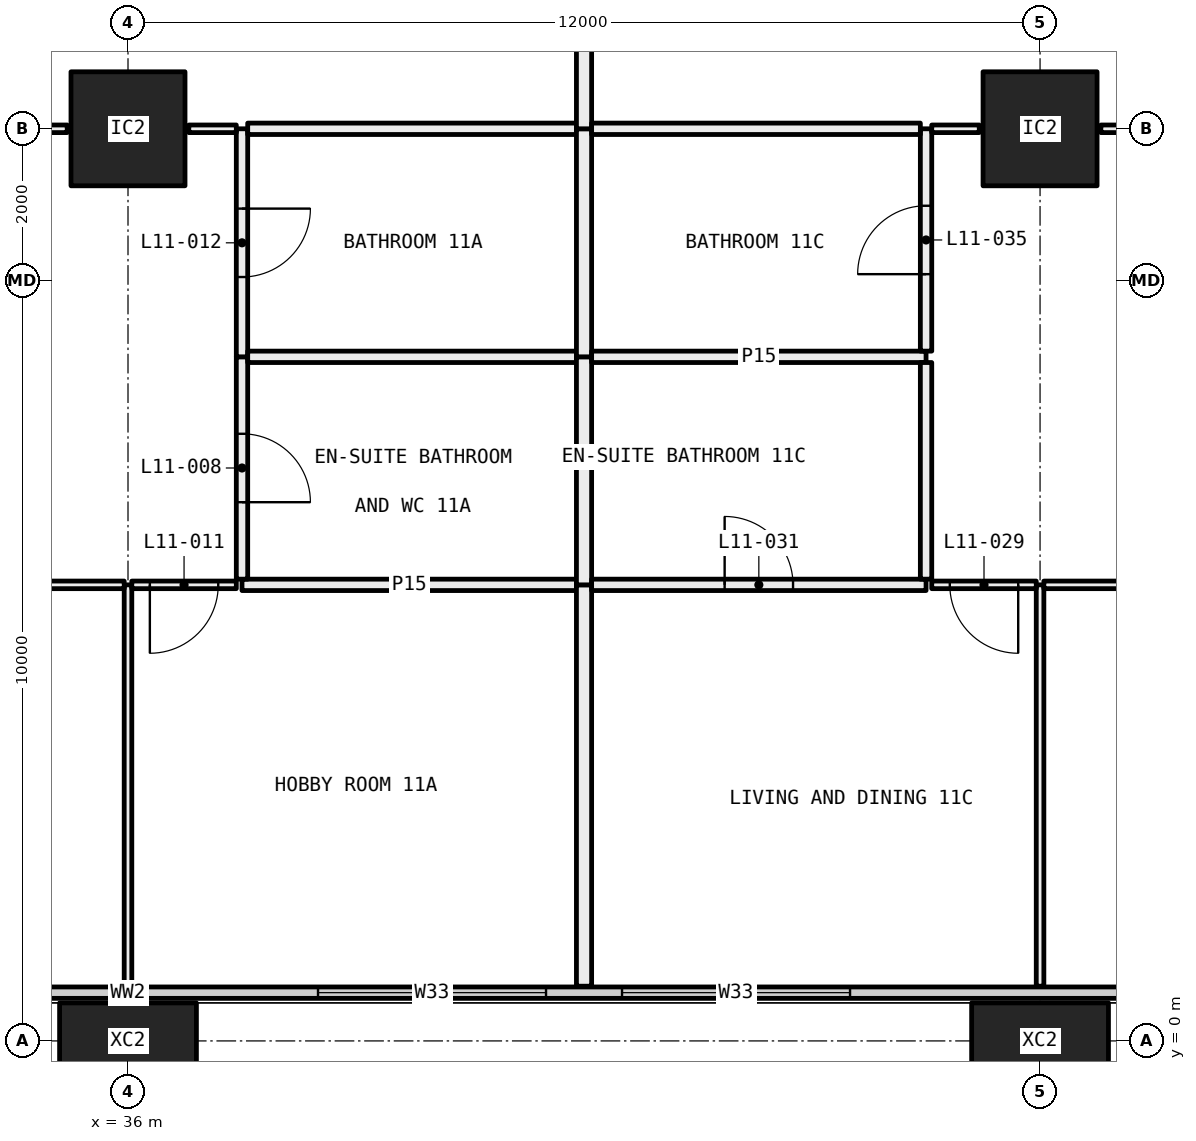
"""IFC4 building model, lengths in metres.
Left out: names, types, materials, properties, quantities, classifications, styles, units other than length and angle.
Written with IfcOpenShell. Run it as: python <this file> out.ifc"""

import sys

from ifc_helpers import new_model, si_unit, direction, frame, frame_2d, origin, origin_2d, place, context, subcontext, project, spatial, rectangle, hollow_rectangle, extrude, element, fill, save


model = new_model("IFC4")
c1 = context("Model", 3, precision=1e-05, world=origin(), true_north=direction((0.0, 1.0)))
c2 = subcontext(c1, "Body", "Model", "MODEL_VIEW")
j1 = project(units=[si_unit("LENGTHUNIT", "METRE"), si_unit("PLANEANGLEUNIT", "RADIAN")], contexts=[c1])
p1 = place(None, origin())
s1 = spatial("IfcSite", under=j1, at=p1, CompositionType="ELEMENT")
p2 = place(p1, origin())
s2 = spatial("IfcBuilding", under=s1, at=p2, CompositionType="ELEMENT")
p3 = place(p2, frame((0.0, 0.0, 50.7)))
s3 = spatial("IfcBuildingStorey", under=s2, at=p3, CompositionType="ELEMENT", Elevation=50.7)
p4 = place(p3, frame((36.0, 0.0, -0.4), z_axis=(0.0, 0.0, 1.0), x_axis=(1.0, 0.0, 0.0)))
e1 = element("IfcColumn", 1, at=p4, inside=s3, PredefinedType="COLUMN", context=c2, shape_type="SweptSolid", body=[
    extrude(hollow_rectangle(XDim=1.8, YDim=1.0, WallThickness=0.07, at=origin_2d()), origin(), (0.0, 0.0, 1.0), 3.45),
])
p5 = place(p3, frame((36.0, 12.0, 0.0), z_axis=(0.0, 0.0, 1.0), x_axis=(1.0, 0.0, 0.0)))
e2 = element("IfcColumn", 2, at=p5, inside=s3, PredefinedType="COLUMN", context=c2, shape_type="SweptSolid", body=[
    extrude(hollow_rectangle(XDim=1.5, YDim=1.5, WallThickness=0.065, at=origin_2d()), origin(), (0.0, 0.0, 1.0), 3.05),
])
p6 = place(p3, frame((48.0, 0.0, -0.4), z_axis=(0.0, 0.0, 1.0), x_axis=(1.0, 0.0, 0.0)))
e3 = element("IfcColumn", 3, at=p6, inside=s3, PredefinedType="COLUMN", context=c2, shape_type="SweptSolid", body=[
    extrude(hollow_rectangle(XDim=1.8, YDim=1.0, WallThickness=0.07, at=origin_2d()), origin(), (0.0, 0.0, 1.0), 3.45),
])
p7 = place(p3, frame((48.0, 12.0, 0.0), z_axis=(0.0, 0.0, 1.0), x_axis=(1.0, 0.0, 0.0)))
e4 = element("IfcColumn", 4, at=p7, inside=s3, PredefinedType="COLUMN", context=c2, shape_type="SweptSolid", body=[
    extrude(hollow_rectangle(XDim=1.5, YDim=1.5, WallThickness=0.065, at=origin_2d()), origin(), (0.0, 0.0, 1.0), 3.05),
])
p8 = place(p3, frame((6.56, 0.635, 0.0), z_axis=(0.0, 0.0, 1.0), x_axis=(1.0, 0.0, 0.0)))
e5 = element("IfcWall", 5, at=p8, inside=s3, PredefinedType="ELEMENTEDWALL", context=c2, shape_type="SweptSolid", body=[
    extrude(rectangle(XDim=58.88, YDim=0.15, at=frame_2d((29.44, 0.0))), origin(), (0.0, 0.0, 1.0), 3.05),
])
p9 = place(p8, frame((0.44, 0.0, 0.45)))
e6 = element("IfcOpeningElement", 6, at=p9, cuts=e5, PredefinedType="OPENING", context=c2, shape_type="SweptSolid", body=[
    extrude(rectangle(XDim=4.5, YDim=2.55, at=frame_2d((2.25, 1.275))), frame((0.0, 0.085, 0.0), z_axis=(0.0, -1.0, 0.0), x_axis=(1.0, 0.0, 0.0)), (0.0, 0.0, 1.0), 0.17),
])
p10 = place(p8, frame((7.94, 0.0, 0.45)))
e7 = element("IfcOpeningElement", 7, at=p10, cuts=e5, PredefinedType="OPENING", context=c2, shape_type="SweptSolid", body=[
    extrude(rectangle(XDim=3.0, YDim=2.55, at=frame_2d((1.5, 1.275))), frame((0.0, 0.085, 0.0), z_axis=(0.0, -1.0, 0.0), x_axis=(1.0, 0.0, 0.0)), (0.0, 0.0, 1.0), 0.17),
])
p11 = place(p8, frame((11.94, 0.0, 0.45)))
e8 = element("IfcOpeningElement", 8, at=p11, cuts=e5, PredefinedType="OPENING", context=c2, shape_type="SweptSolid", body=[
    extrude(rectangle(XDim=3.0, YDim=2.55, at=frame_2d((1.5, 1.275))), frame((0.0, 0.085, 0.0), z_axis=(0.0, -1.0, 0.0), x_axis=(1.0, 0.0, 0.0)), (0.0, 0.0, 1.0), 0.17),
])
p12 = place(p8, frame((19.94, 0.0, 0.45)))
e9 = element("IfcOpeningElement", 9, at=p12, cuts=e5, PredefinedType="OPENING", context=c2, shape_type="SweptSolid", body=[
    extrude(rectangle(XDim=3.0, YDim=2.55, at=frame_2d((1.5, 1.275))), frame((0.0, 0.085, 0.0), z_axis=(0.0, -1.0, 0.0), x_axis=(1.0, 0.0, 0.0)), (0.0, 0.0, 1.0), 0.17),
])
p13 = place(p8, frame((23.94, 0.0, 0.45)))
e10 = element("IfcOpeningElement", 10, at=p13, cuts=e5, PredefinedType="OPENING", context=c2, shape_type="SweptSolid", body=[
    extrude(rectangle(XDim=2.0, YDim=2.55, at=frame_2d((1.0, 1.275))), frame((0.0, 0.085, 0.0), z_axis=(0.0, -1.0, 0.0), x_axis=(1.0, 0.0, 0.0)), (0.0, 0.0, 1.0), 0.17),
])
p14 = place(p8, frame((31.94, 0.0, 0.45)))
e11 = element("IfcOpeningElement", 11, at=p14, cuts=e5, PredefinedType="OPENING", context=c2, shape_type="SweptSolid", body=[
    extrude(rectangle(XDim=3.0, YDim=2.55, at=frame_2d((1.5, 1.275))), frame((0.0, 0.085, 0.0), z_axis=(0.0, -1.0, 0.0), x_axis=(1.0, 0.0, 0.0)), (0.0, 0.0, 1.0), 0.17),
])
p15 = place(p8, frame((35.94, 0.0, 0.45)))
e12 = element("IfcOpeningElement", 12, at=p15, cuts=e5, PredefinedType="OPENING", context=c2, shape_type="SweptSolid", body=[
    extrude(rectangle(XDim=3.0, YDim=2.55, at=frame_2d((1.5, 1.275))), frame((0.0, 0.085, 0.0), z_axis=(0.0, -1.0, 0.0), x_axis=(1.0, 0.0, 0.0)), (0.0, 0.0, 1.0), 0.17),
])
p16 = place(p8, frame((43.94, 0.0, 0.45)))
e13 = element("IfcOpeningElement", 13, at=p16, cuts=e5, PredefinedType="OPENING", context=c2, shape_type="SweptSolid", body=[
    extrude(rectangle(XDim=3.0, YDim=2.55, at=frame_2d((1.5, 1.275))), frame((0.0, 0.085, 0.0), z_axis=(0.0, -1.0, 0.0), x_axis=(1.0, 0.0, 0.0)), (0.0, 0.0, 1.0), 0.17),
])
p17 = place(p8, frame((47.94, 0.0, 0.45)))
e14 = element("IfcOpeningElement", 14, at=p17, cuts=e5, PredefinedType="OPENING", context=c2, shape_type="SweptSolid", body=[
    extrude(rectangle(XDim=2.0, YDim=2.55, at=frame_2d((1.0, 1.275))), frame((0.0, 0.085, 0.0), z_axis=(0.0, -1.0, 0.0), x_axis=(1.0, 0.0, 0.0)), (0.0, 0.0, 1.0), 0.17),
])
p18 = place(p8, frame((53.94, 0.0, 0.45)))
e15 = element("IfcOpeningElement", 15, at=p18, cuts=e5, PredefinedType="OPENING", context=c2, shape_type="SweptSolid", body=[
    extrude(rectangle(XDim=4.5, YDim=2.55, at=frame_2d((2.25, 1.275))), frame((0.0, 0.085, 0.0), z_axis=(0.0, -1.0, 0.0), x_axis=(1.0, 0.0, 0.0)), (0.0, 0.0, 1.0), 0.17),
])
p19 = place(p3, frame((36.0, 0.72, 0.0), z_axis=(0.0, 0.0, 1.0), x_axis=(0.0, 1.0, 0.0)))
e16 = element("IfcWall", 16, at=p19, inside=s3, PredefinedType="PARTITIONING", context=c2, shape_type="SweptSolid", body=[
    extrude(rectangle(XDim=5.28, YDim=0.1, at=frame_2d((2.64, 0.0))), origin(), (0.0, 0.0, 1.0), 2.45),
])
p20 = place(p3, frame((35.95, 6.0, 0.0), z_axis=(0.0, 0.0, 1.0), x_axis=(-1.0, 0.0, 0.0)))
e17 = element("IfcWall", 17, at=p20, inside=s3, PredefinedType="PARTITIONING", context=c2, shape_type="SweptSolid", body=[
    extrude(rectangle(XDim=5.9, YDim=0.1, at=frame_2d((2.95, 0.0))), origin(), (0.0, 0.0, 1.0), 2.45),
])
p21 = place(p20, frame((2.5, 0.0, 0.0)))
e18 = element("IfcOpeningElement", 18, at=p21, cuts=e17, PredefinedType="OPENING", context=c2, shape_type="SweptSolid", body=[
    extrude(rectangle(XDim=0.9, YDim=2.1, at=frame_2d((0.45, 1.05))), frame((0.0, 0.06, 0.0), z_axis=(0.0, -1.0, 0.0), x_axis=(1.0, 0.0, 0.0)), (0.0, 0.0, 1.0), 0.12),
])
p22 = place(p3, frame((37.425, 6.0, 0.0), z_axis=(0.0, 0.0, 1.0), x_axis=(-1.0, 0.0, 0.0)))
e19 = element("IfcWall", 19, at=p22, inside=s3, PredefinedType="PARTITIONING", context=c2, shape_type="SweptSolid", body=[
    extrude(rectangle(XDim=1.375, YDim=0.1, at=frame_2d((0.688, 0.0))), origin(), (0.0, 0.0, 1.0), 2.45),
])
p23 = place(p22, frame((0.238, 0.0, 0.0)))
e20 = element("IfcOpeningElement", 20, at=p23, cuts=e19, PredefinedType="OPENING", context=c2, shape_type="SweptSolid", body=[
    extrude(rectangle(XDim=0.9, YDim=2.1, at=frame_2d((0.45, 1.05))), frame((0.0, 0.06, 0.0), z_axis=(0.0, -1.0, 0.0), x_axis=(1.0, 0.0, 0.0)), (0.0, 0.0, 1.0), 0.12),
])
p24 = place(p3, frame((41.9, 6.0, 0.0), z_axis=(0.0, 0.0, 1.0), x_axis=(-1.0, 0.0, 0.0)))
e21 = element("IfcWall", 21, at=p24, inside=s3, PredefinedType="PARTITIONING", context=c2, shape_type="SweptSolid", body=[
    extrude(rectangle(XDim=4.4, YDim=0.15, at=frame_2d((2.2, 0.0))), origin(), (0.0, 0.0, 1.0), 3.05),
])
p25 = place(p3, frame((42.0, 0.72, 0.0), z_axis=(0.0, 0.0, 1.0), x_axis=(0.0, 1.0, 0.0)))
e22 = element("IfcWall", 22, at=p25, inside=s3, PredefinedType="PARTITIONING", context=c2, shape_type="SweptSolid", body=[
    extrude(rectangle(XDim=5.28, YDim=0.2, at=frame_2d((2.64, 0.0))), origin(), (0.0, 0.0, 1.0), 3.05),
])
p26 = place(p3, frame((37.5, 6.075, 0.0), z_axis=(0.0, 0.0, 1.0), x_axis=(0.0, 1.0, 0.0)))
e23 = element("IfcWall", 23, at=p26, inside=s3, PredefinedType="PARTITIONING", context=c2, shape_type="SweptSolid", body=[
    extrude(rectangle(XDim=2.925, YDim=0.15, at=frame_2d((1.462, 0.0))), origin(), (0.0, 0.0, 1.0), 3.05),
])
p27 = place(p26, frame((1.012, 0.0, 0.0)))
e24 = element("IfcOpeningElement", 24, at=p27, cuts=e23, PredefinedType="OPENING", context=c2, shape_type="SweptSolid", body=[
    extrude(rectangle(XDim=0.9, YDim=2.1, at=frame_2d((0.45, 1.05))), frame((0.0, 0.085, 0.0), z_axis=(0.0, -1.0, 0.0), x_axis=(1.0, 0.0, 0.0)), (0.0, 0.0, 1.0), 0.17),
])
p28 = place(p3, frame((37.5, 9.0, 0.0), z_axis=(0.0, 0.0, 1.0), x_axis=(0.0, 1.0, 0.0)))
e25 = element("IfcWall", 25, at=p28, inside=s3, PredefinedType="PARTITIONING", context=c2, shape_type="SweptSolid", body=[
    extrude(rectangle(XDim=3.0, YDim=0.15, at=frame_2d((1.5, 0.0))), origin(), (0.0, 0.0, 1.0), 2.45),
])
p29 = place(p28, frame((1.05, 0.0, 0.0)))
e26 = element("IfcOpeningElement", 26, at=p29, cuts=e25, PredefinedType="OPENING", context=c2, shape_type="SweptSolid", body=[
    extrude(rectangle(XDim=0.9, YDim=2.1, at=frame_2d((0.45, 1.05))), frame((0.0, 0.085, 0.0), z_axis=(0.0, -1.0, 0.0), x_axis=(1.0, 0.0, 0.0)), (0.0, 0.0, 1.0), 0.17),
])
p30 = place(p3, frame((35.2, 12.0, 0.0), z_axis=(0.0, 0.0, 1.0), x_axis=(-1.0, 0.0, 0.0)))
e27 = element("IfcWall", 27, at=p30, inside=s3, PredefinedType="PARTITIONING", context=c2, shape_type="SweptSolid", body=[
    extrude(rectangle(XDim=2.2, YDim=0.1, at=frame_2d((1.1, 0.0))), origin(), (0.0, 0.0, 1.0), 2.45),
])
p31 = place(p30, frame((0.65, 0.0, 0.0)))
e28 = element("IfcOpeningElement", 28, at=p31, cuts=e27, PredefinedType="OPENING", context=c2, shape_type="SweptSolid", body=[
    extrude(rectangle(XDim=0.9, YDim=2.1, at=frame_2d((0.45, 1.05))), frame((0.0, 0.06, 0.0), z_axis=(0.0, -1.0, 0.0), x_axis=(1.0, 0.0, 0.0)), (0.0, 0.0, 1.0), 0.12),
])
p32 = place(p3, frame((37.425, 12.0, 0.0), z_axis=(0.0, 0.0, 1.0), x_axis=(-1.0, 0.0, 0.0)))
e29 = element("IfcWall", 29, at=p32, inside=s3, PredefinedType="PARTITIONING", context=c2, shape_type="SweptSolid", body=[
    extrude(rectangle(XDim=0.625, YDim=0.1, at=frame_2d((0.312, 0.0))), origin(), (0.0, 0.0, 1.0), 2.45),
])
p33 = place(p3, frame((41.9, 9.0, 0.0), z_axis=(0.0, 0.0, 1.0), x_axis=(-1.0, 0.0, 0.0)))
e30 = element("IfcWall", 30, at=p33, inside=s3, PredefinedType="PARTITIONING", context=c2, shape_type="SweptSolid", body=[
    extrude(rectangle(XDim=4.325, YDim=0.15, at=frame_2d((2.163, 0.0))), origin(), (0.0, 0.0, 1.0), 3.05),
])
p34 = place(p3, frame((42.0, 6.0, 0.0), z_axis=(0.0, 0.0, 1.0), x_axis=(0.0, 1.0, 0.0)))
e31 = element("IfcWall", 31, at=p34, inside=s3, PredefinedType="PARTITIONING", context=c2, shape_type="SweptSolid", body=[
    extrude(rectangle(XDim=3.0, YDim=0.2, at=frame_2d((1.5, 0.0))), origin(), (0.0, 0.0, 1.0), 3.05),
])
p35 = place(p3, frame((41.9, 12.0, 0.0), z_axis=(0.0, 0.0, 1.0), x_axis=(-1.0, 0.0, 0.0)))
e32 = element("IfcWall", 32, at=p35, inside=s3, PredefinedType="PARTITIONING", context=c2, shape_type="SweptSolid", body=[
    extrude(rectangle(XDim=4.325, YDim=0.15, at=frame_2d((2.163, 0.0))), origin(), (0.0, 0.0, 1.0), 2.45),
])
p36 = place(p3, frame((42.0, 9.0, 0.0), z_axis=(0.0, 0.0, 1.0), x_axis=(0.0, 1.0, 0.0)))
e33 = element("IfcWall", 33, at=p36, inside=s3, PredefinedType="PARTITIONING", context=c2, shape_type="SweptSolid", body=[
    extrude(rectangle(XDim=3.0, YDim=0.2, at=frame_2d((1.5, 0.0))), origin(), (0.0, 0.0, 1.0), 2.45),
])
p37 = place(p3, frame((42.0, 12.0, 0.0), z_axis=(0.0, 0.0, 1.0), x_axis=(0.0, 1.0, 0.0)))
e34 = element("IfcWall", 34, at=p37, inside=s3, PredefinedType="PARTITIONING", context=c2, shape_type="SweptSolid", body=[
    extrude(rectangle(XDim=5.9, YDim=0.2, at=frame_2d((2.95, 0.0))), origin(), (0.0, 0.0, 1.0), 2.45),
])
p38 = place(p3, frame((48.0, 0.72, 0.0), z_axis=(0.0, 0.0, 1.0), x_axis=(0.0, 1.0, 0.0)))
e35 = element("IfcWall", 35, at=p38, inside=s3, PredefinedType="PARTITIONING", context=c2, shape_type="SweptSolid", body=[
    extrude(rectangle(XDim=5.28, YDim=0.1, at=frame_2d((2.64, 0.0))), origin(), (0.0, 0.0, 1.0), 2.45),
])
p39 = place(p3, frame((46.5, 6.0, 0.0), z_axis=(0.0, 0.0, 1.0), x_axis=(-1.0, 0.0, 0.0)))
e36 = element("IfcWall", 36, at=p39, inside=s3, PredefinedType="PARTITIONING", context=c2, shape_type="SweptSolid", body=[
    extrude(rectangle(XDim=4.4, YDim=0.15, at=frame_2d((2.2, 0.0))), origin(), (0.0, 0.0, 1.0), 3.05),
])
p40 = place(p39, frame((1.75, 0.0, 0.0)))
e37 = element("IfcOpeningElement", 37, at=p40, cuts=e36, PredefinedType="OPENING", context=c2, shape_type="SweptSolid", body=[
    extrude(rectangle(XDim=0.9, YDim=2.1, at=frame_2d((0.45, 1.05))), frame((0.0, 0.085, 0.0), z_axis=(0.0, -1.0, 0.0), x_axis=(1.0, 0.0, 0.0)), (0.0, 0.0, 1.0), 0.17),
])
p41 = place(p3, frame((47.95, 6.0, 0.0), z_axis=(0.0, 0.0, 1.0), x_axis=(-1.0, 0.0, 0.0)))
e38 = element("IfcWall", 38, at=p41, inside=s3, PredefinedType="PARTITIONING", context=c2, shape_type="SweptSolid", body=[
    extrude(rectangle(XDim=1.375, YDim=0.1, at=frame_2d((0.688, 0.0))), origin(), (0.0, 0.0, 1.0), 2.45),
])
p42 = place(p41, frame((0.238, 0.0, 0.0)))
e39 = element("IfcOpeningElement", 39, at=p42, cuts=e38, PredefinedType="OPENING", context=c2, shape_type="SweptSolid", body=[
    extrude(rectangle(XDim=0.9, YDim=2.1, at=frame_2d((0.45, 1.05))), frame((0.0, 0.06, 0.0), z_axis=(0.0, -1.0, 0.0), x_axis=(1.0, 0.0, 0.0)), (0.0, 0.0, 1.0), 0.12),
])
p43 = place(p3, frame((53.95, 6.0, 0.0), z_axis=(0.0, 0.0, 1.0), x_axis=(-1.0, 0.0, 0.0)))
e40 = element("IfcWall", 40, at=p43, inside=s3, PredefinedType="PARTITIONING", context=c2, shape_type="SweptSolid", body=[
    extrude(rectangle(XDim=5.9, YDim=0.1, at=frame_2d((2.95, 0.0))), origin(), (0.0, 0.0, 1.0), 2.45),
])
p44 = place(p43, frame((2.5, 0.0, 0.0)))
e41 = element("IfcOpeningElement", 41, at=p44, cuts=e40, PredefinedType="OPENING", context=c2, shape_type="SweptSolid", body=[
    extrude(rectangle(XDim=0.9, YDim=2.1, at=frame_2d((0.45, 1.05))), frame((0.0, 0.06, 0.0), z_axis=(0.0, -1.0, 0.0), x_axis=(1.0, 0.0, 0.0)), (0.0, 0.0, 1.0), 0.12),
])
p45 = place(p3, frame((46.5, 9.0, 0.0), z_axis=(0.0, 0.0, 1.0), x_axis=(-1.0, 0.0, 0.0)))
e42 = element("IfcWall", 42, at=p45, inside=s3, PredefinedType="PARTITIONING", context=c2, shape_type="SweptSolid", body=[
    extrude(rectangle(XDim=4.4, YDim=0.15, at=frame_2d((2.2, 0.0))), origin(), (0.0, 0.0, 1.0), 3.05),
])
p46 = place(p3, frame((46.5, 6.075, 0.0), z_axis=(0.0, 0.0, 1.0), x_axis=(0.0, 1.0, 0.0)))
e43 = element("IfcWall", 43, at=p46, inside=s3, PredefinedType="PARTITIONING", context=c2, shape_type="SweptSolid", body=[
    extrude(rectangle(XDim=2.85, YDim=0.15, at=frame_2d((1.425, 0.0))), origin(), (0.0, 0.0, 1.0), 3.05),
])
p47 = place(p3, frame((46.5, 9.075, 0.0), z_axis=(0.0, 0.0, 1.0), x_axis=(0.0, 1.0, 0.0)))
e44 = element("IfcWall", 44, at=p47, inside=s3, PredefinedType="PARTITIONING", context=c2, shape_type="SweptSolid", body=[
    extrude(rectangle(XDim=2.925, YDim=0.15, at=frame_2d((1.462, 0.0))), origin(), (0.0, 0.0, 1.0), 2.45),
])
p48 = place(p47, frame((1.012, 0.0, 0.0)))
e45 = element("IfcOpeningElement", 45, at=p48, cuts=e44, PredefinedType="OPENING", context=c2, shape_type="SweptSolid", body=[
    extrude(rectangle(XDim=0.9, YDim=2.1, at=frame_2d((0.45, 1.05))), frame((0.0, 0.085, 0.0), z_axis=(0.0, -1.0, 0.0), x_axis=(1.0, 0.0, 0.0)), (0.0, 0.0, 1.0), 0.17),
])
p49 = place(p3, frame((46.425, 12.0, 0.0), z_axis=(0.0, 0.0, 1.0), x_axis=(-1.0, 0.0, 0.0)))
e46 = element("IfcWall", 46, at=p49, inside=s3, PredefinedType="PARTITIONING", context=c2, shape_type="SweptSolid", body=[
    extrude(rectangle(XDim=4.325, YDim=0.15, at=frame_2d((2.163, 0.0))), origin(), (0.0, 0.0, 1.0), 2.45),
])
p50 = place(p3, frame((47.2, 12.0, 0.0), z_axis=(0.0, 0.0, 1.0), x_axis=(-1.0, 0.0, 0.0)))
e47 = element("IfcWall", 47, at=p50, inside=s3, PredefinedType="PARTITIONING", context=c2, shape_type="SweptSolid", body=[
    extrude(rectangle(XDim=0.625, YDim=0.1, at=frame_2d((0.312, 0.0))), origin(), (0.0, 0.0, 1.0), 2.45),
])
p51 = place(p3, frame((52.5, 12.0, 0.0), z_axis=(0.0, 0.0, 1.0), x_axis=(-1.0, 0.0, 0.0)))
e48 = element("IfcWall", 48, at=p51, inside=s3, PredefinedType="PARTITIONING", context=c2, shape_type="SweptSolid", body=[
    extrude(rectangle(XDim=3.7, YDim=0.1, at=frame_2d((1.85, 0.0))), origin(), (0.0, 0.0, 1.0), 2.45),
])
p52 = place(p14, origin())
e49 = element("IfcWindow", 49, at=p52, inside=s3, PartitioningType="SINGLE_PANEL", PredefinedType="WINDOW", context=c2, shape_type="SweptSolid", body=[
    extrude(rectangle(XDim=3.0, YDim=2.55, at=frame_2d((1.5, 1.275))), frame((0.0, 0.03, 0.0), z_axis=(0.0, -1.0, 0.0), x_axis=(1.0, 0.0, 0.0)), (0.0, 0.0, 1.0), 0.06),
])
fill(e11, e49)
p53 = place(p15, origin())
e50 = element("IfcWindow", 50, at=p53, inside=s3, PartitioningType="SINGLE_PANEL", PredefinedType="WINDOW", context=c2, shape_type="SweptSolid", body=[
    extrude(rectangle(XDim=3.0, YDim=2.55, at=frame_2d((1.5, 1.275))), frame((0.0, 0.03, 0.0), z_axis=(0.0, -1.0, 0.0), x_axis=(1.0, 0.0, 0.0)), (0.0, 0.0, 1.0), 0.06),
])
fill(e12, e50)
p54 = place(p27, frame((0.9, 0.0, 0.0), x_axis=(-1.0, 0.0, 0.0)))
e51 = element("IfcDoor", 51, at=p54, inside=s3, OperationType="SINGLE_SWING_LEFT", PredefinedType="DOOR", context=c2, shape_type="SweptSolid", body=[
    extrude(rectangle(XDim=0.9, YDim=2.1, at=frame_2d((0.45, 1.05))), frame((0.0, 0.025, 0.0), z_axis=(0.0, -1.0, 0.0), x_axis=(1.0, 0.0, 0.0)), (0.0, 0.0, 1.0), 0.05),
])
fill(e24, e51)
p55 = place(p23, origin())
e52 = element("IfcDoor", 52, at=p55, inside=s3, OperationType="SINGLE_SWING_LEFT", PredefinedType="DOOR", context=c2, shape_type="SweptSolid", body=[
    extrude(rectangle(XDim=0.9, YDim=2.1, at=frame_2d((0.45, 1.05))), frame((0.0, 0.025, 0.0), z_axis=(0.0, -1.0, 0.0), x_axis=(1.0, 0.0, 0.0)), (0.0, 0.0, 1.0), 0.05),
])
fill(e20, e52)
p56 = place(p29, frame((0.9, 0.0, 0.0), x_axis=(-1.0, 0.0, 0.0)))
e53 = element("IfcDoor", 53, at=p56, inside=s3, OperationType="SINGLE_SWING_RIGHT", PredefinedType="DOOR", context=c2, shape_type="SweptSolid", body=[
    extrude(rectangle(XDim=0.9, YDim=2.1, at=frame_2d((0.45, 1.05))), frame((0.0, 0.025, 0.0), z_axis=(0.0, -1.0, 0.0), x_axis=(1.0, 0.0, 0.0)), (0.0, 0.0, 1.0), 0.05),
])
fill(e26, e53)
p57 = place(p42, origin())
e54 = element("IfcDoor", 54, at=p57, inside=s3, OperationType="SINGLE_SWING_RIGHT", PredefinedType="DOOR", context=c2, shape_type="SweptSolid", body=[
    extrude(rectangle(XDim=0.9, YDim=2.1, at=frame_2d((0.45, 1.05))), frame((0.0, 0.025, 0.0), z_axis=(0.0, -1.0, 0.0), x_axis=(1.0, 0.0, 0.0)), (0.0, 0.0, 1.0), 0.05),
])
fill(e39, e54)
p58 = place(p40, frame((0.9, 0.0, 0.0), x_axis=(-1.0, 0.0, 0.0)))
e55 = element("IfcDoor", 55, at=p58, inside=s3, OperationType="SINGLE_SWING_RIGHT", PredefinedType="DOOR", context=c2, shape_type="SweptSolid", body=[
    extrude(rectangle(XDim=0.9, YDim=2.1, at=frame_2d((0.45, 1.05))), frame((0.0, 0.025, 0.0), z_axis=(0.0, -1.0, 0.0), x_axis=(1.0, 0.0, 0.0)), (0.0, 0.0, 1.0), 0.05),
])
fill(e37, e55)
p59 = place(p48, origin())
e56 = element("IfcDoor", 56, at=p59, inside=s3, OperationType="SINGLE_SWING_RIGHT", PredefinedType="DOOR", context=c2, shape_type="SweptSolid", body=[
    extrude(rectangle(XDim=0.9, YDim=2.1, at=frame_2d((0.45, 1.05))), frame((0.0, 0.025, 0.0), z_axis=(0.0, -1.0, 0.0), x_axis=(1.0, 0.0, 0.0)), (0.0, 0.0, 1.0), 0.05),
])
fill(e45, e56)
save(model, sys.argv[1])
